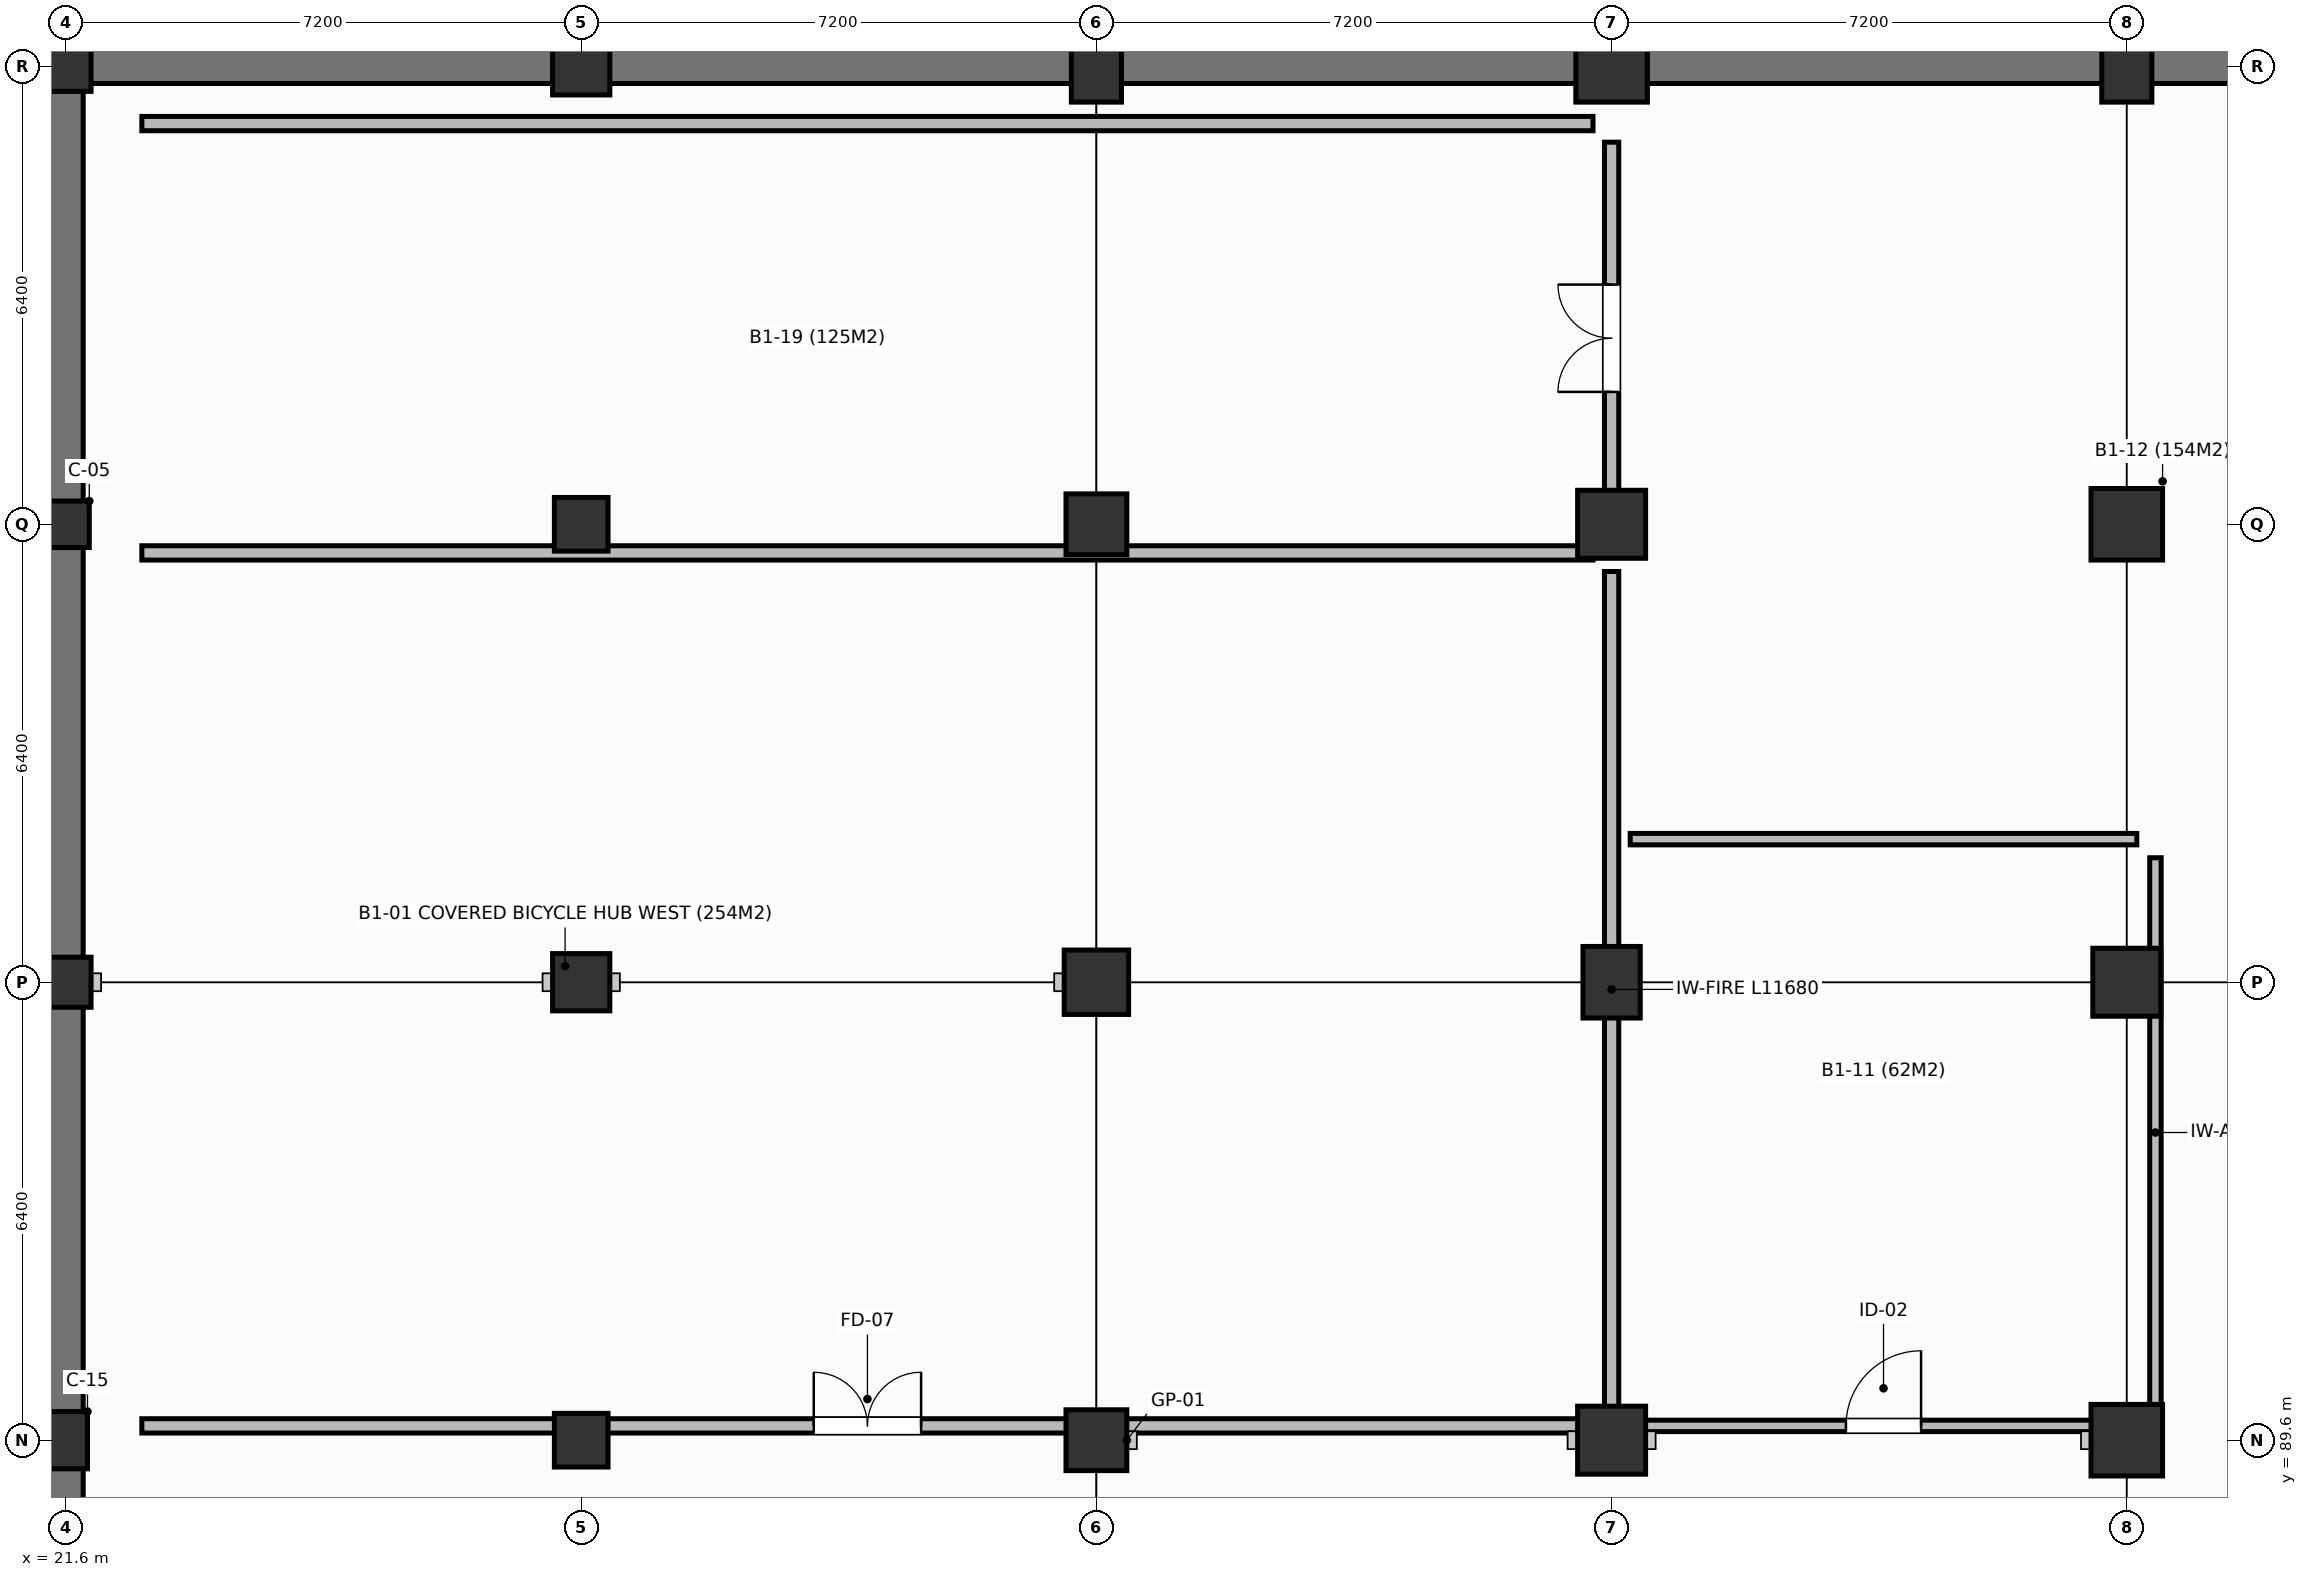
"""IFC4 building model, lengths in metres.
Left out: names, types, materials, properties, quantities, classifications, styles, units other than length and angle.
Written with IfcOpenShell. Run it as: python <this file> out.ifc"""

import sys

from ifc_helpers import new_model, si_unit, direction, frame, frame_2d, origin, origin_2d, place, context, subcontext, project, spatial, rectangle, extrude, element, fill, save


model = new_model("IFC4")
c1 = context("Model", 3, precision=1e-05, world=origin(), true_north=direction((0.0, 1.0)))
c2 = subcontext(c1, "Body", "Model", "MODEL_VIEW")
j1 = project(units=[si_unit("LENGTHUNIT", "METRE"), si_unit("PLANEANGLEUNIT", "RADIAN")], contexts=[c1])
p1 = place(None, origin())
s1 = spatial("IfcSite", under=j1, at=p1, CompositionType="ELEMENT")
p2 = place(p1, origin())
s2 = spatial("IfcBuilding", under=s1, at=p2, CompositionType="ELEMENT")
p3 = place(p2, frame((0.0, 0.0, -4.8)))
s3 = spatial("IfcBuildingStorey", under=s2, at=p3, CompositionType="ELEMENT", Elevation=-4.8)
p4 = place(p3, frame((21.6, 89.6, 0.0), z_axis=(0.0, 0.0, 1.0), x_axis=(1.0, 0.0, 0.0)))
e1 = element("IfcColumn", 1, at=p4, inside=s3, PredefinedType="COLUMN", context=c2, shape_type="SweptSolid", body=[
    extrude(rectangle(XDim=0.6, YDim=0.8, at=origin_2d()), origin(), (0.0, 0.0, 1.0), 4.8),
])
p5 = place(p3, frame((21.6, 96.0, 0.0), z_axis=(0.0, 0.0, 1.0), x_axis=(1.0, 0.0, 0.0)))
e2 = element("IfcColumn", 2, at=p5, inside=s3, PredefinedType="COLUMN", context=c2, shape_type="SweptSolid", body=[
    extrude(rectangle(XDim=0.7, YDim=0.7, at=origin_2d()), origin(), (0.0, 0.0, 1.0), 4.8),
])
p6 = place(p3, frame((21.6, 102.4, 0.0), z_axis=(0.0, 0.0, 1.0), x_axis=(1.0, 0.0, 0.0)))
e3 = element("IfcColumn", 3, at=p6, inside=s3, PredefinedType="COLUMN", context=c2, shape_type="SweptSolid", body=[
    extrude(rectangle(XDim=0.65, YDim=0.65, at=origin_2d()), origin(), (0.0, 0.0, 1.0), 4.8),
])
p7 = place(p3, frame((21.6, 108.8, 0.0), z_axis=(0.0, 0.0, 1.0), x_axis=(1.0, 0.0, 0.0)))
e4 = element("IfcColumn", 4, at=p7, inside=s3, PredefinedType="COLUMN", context=c2, shape_type="SweptSolid", body=[
    extrude(rectangle(XDim=0.7, YDim=0.7, at=origin_2d()), origin(), (0.0, 0.0, 1.0), 4.8),
])
p8 = place(p3, frame((28.8, 89.6, 0.0), z_axis=(0.0, 0.0, 1.0), x_axis=(1.0, 0.0, 0.0)))
e5 = element("IfcColumn", 5, at=p8, inside=s3, PredefinedType="COLUMN", context=c2, shape_type="SweptSolid", body=[
    extrude(rectangle(XDim=0.75, YDim=0.75, at=origin_2d()), origin(), (0.0, 0.0, 1.0), 4.8),
])
p9 = place(p3, frame((28.8, 96.0, 0.0), z_axis=(0.0, 0.0, 1.0), x_axis=(1.0, 0.0, 0.0)))
e6 = element("IfcColumn", 6, at=p9, inside=s3, PredefinedType="COLUMN", context=c2, shape_type="SweptSolid", body=[
    extrude(rectangle(XDim=0.8, YDim=0.8, at=origin_2d()), origin(), (0.0, 0.0, 1.0), 4.8),
])
p10 = place(p3, frame((28.8, 102.4, 0.0), z_axis=(0.0, 0.0, 1.0), x_axis=(1.0, 0.0, 0.0)))
e7 = element("IfcColumn", 7, at=p10, inside=s3, PredefinedType="COLUMN", context=c2, shape_type="SweptSolid", body=[
    extrude(rectangle(XDim=0.75, YDim=0.75, at=origin_2d()), origin(), (0.0, 0.0, 1.0), 4.8),
])
p11 = place(p3, frame((28.8, 108.8, 0.0), z_axis=(0.0, 0.0, 1.0), x_axis=(1.0, 0.0, 0.0)))
e8 = element("IfcColumn", 8, at=p11, inside=s3, PredefinedType="COLUMN", context=c2, shape_type="SweptSolid", body=[
    extrude(rectangle(XDim=0.8, YDim=0.8, at=origin_2d()), origin(), (0.0, 0.0, 1.0), 4.8),
])
p12 = place(p3, frame((36.0, 89.6, 0.0), z_axis=(0.0, 0.0, 1.0), x_axis=(1.0, 0.0, 0.0)))
e9 = element("IfcColumn", 9, at=p12, inside=s3, PredefinedType="COLUMN", context=c2, shape_type="SweptSolid", body=[
    extrude(rectangle(XDim=0.85, YDim=0.85, at=origin_2d()), origin(), (0.0, 0.0, 1.0), 4.8),
])
p13 = place(p3, frame((36.0, 96.0, 0.0), z_axis=(0.0, 0.0, 1.0), x_axis=(1.0, 0.0, 0.0)))
e10 = element("IfcColumn", 10, at=p13, inside=s3, PredefinedType="COLUMN", context=c2, shape_type="SweptSolid", body=[
    extrude(rectangle(XDim=0.9, YDim=0.9, at=origin_2d()), origin(), (0.0, 0.0, 1.0), 4.8),
])
p14 = place(p3, frame((36.0, 102.4, 0.0), z_axis=(0.0, 0.0, 1.0), x_axis=(1.0, 0.0, 0.0)))
e11 = element("IfcColumn", 11, at=p14, inside=s3, PredefinedType="COLUMN", context=c2, shape_type="SweptSolid", body=[
    extrude(rectangle(XDim=0.85, YDim=0.85, at=origin_2d()), origin(), (0.0, 0.0, 1.0), 4.8),
])
p15 = place(p3, frame((36.0, 108.8, 0.0), z_axis=(0.0, 0.0, 1.0), x_axis=(1.0, 0.0, 0.0)))
e12 = element("IfcColumn", 12, at=p15, inside=s3, PredefinedType="COLUMN", context=c2, shape_type="SweptSolid", body=[
    extrude(rectangle(XDim=0.7, YDim=1.0, at=origin_2d()), origin(), (0.0, 0.0, 1.0), 4.8),
])
p16 = place(p3, frame((43.2, 89.6, 0.0), z_axis=(0.0, 0.0, 1.0), x_axis=(1.0, 0.0, 0.0)))
e13 = element("IfcColumn", 13, at=p16, inside=s3, PredefinedType="COLUMN", context=c2, shape_type="SweptSolid", body=[
    extrude(rectangle(XDim=0.95, YDim=0.95, at=origin_2d()), origin(), (0.0, 0.0, 1.0), 4.8),
])
p17 = place(p3, frame((43.2, 96.0, 0.0), z_axis=(0.0, 0.0, 1.0), x_axis=(1.0, 0.0, 0.0)))
e14 = element("IfcColumn", 14, at=p17, inside=s3, PredefinedType="COLUMN", context=c2, shape_type="SweptSolid", body=[
    extrude(rectangle(XDim=0.8, YDim=1.0, at=origin_2d()), origin(), (0.0, 0.0, 1.0), 4.8),
])
p18 = place(p3, frame((43.2, 102.4, 0.0), z_axis=(0.0, 0.0, 1.0), x_axis=(1.0, 0.0, 0.0)))
e15 = element("IfcColumn", 15, at=p18, inside=s3, PredefinedType="COLUMN", context=c2, shape_type="SweptSolid", body=[
    extrude(rectangle(XDim=0.95, YDim=0.95, at=origin_2d()), origin(), (0.0, 0.0, 1.0), 4.8),
])
for number, where, z_axis, x_axis in (
    (16, (43.2, 108.8, 0.0), (0.0, 0.0, 1.0), (1.0, 0.0, 0.0)),
    (17, (50.4, 89.6, 0.0), (0.0, 0.0, 1.0), (1.0, 0.0, 0.0)),
):
    element("IfcColumn", number, at=place(p3, frame(where, z_axis=z_axis, x_axis=x_axis)), inside=s3, PredefinedType="COLUMN", context=c2, shape_type="SweptSolid", body=[
        extrude(rectangle(XDim=1.0, YDim=1.0, at=origin_2d()), origin(), (0.0, 0.0, 1.0), 4.8),
    ])
p19 = place(p3, frame((50.4, 96.0, 0.0), z_axis=(0.0, 0.0, 1.0), x_axis=(1.0, 0.0, 0.0)))
e18 = element("IfcColumn", 18, at=p19, inside=s3, PredefinedType="COLUMN", context=c2, shape_type="SweptSolid", body=[
    extrude(rectangle(XDim=0.95, YDim=0.95, at=origin_2d()), origin(), (0.0, 0.0, 1.0), 4.8),
])
p20 = place(p3, frame((50.4, 102.4, 0.0), z_axis=(0.0, 0.0, 1.0), x_axis=(1.0, 0.0, 0.0)))
e19 = element("IfcColumn", 19, at=p20, inside=s3, PredefinedType="COLUMN", context=c2, shape_type="SweptSolid", body=[
    extrude(rectangle(XDim=1.0, YDim=1.0, at=origin_2d()), origin(), (0.0, 0.0, 1.0), 4.8),
])
p21 = place(p3, frame((50.4, 108.8, 0.0), z_axis=(0.0, 0.0, 1.0), x_axis=(1.0, 0.0, 0.0)))
e20 = element("IfcColumn", 20, at=p21, inside=s3, PredefinedType="COLUMN", context=c2, shape_type="SweptSolid", body=[
    extrude(rectangle(XDim=0.7, YDim=1.0, at=origin_2d()), origin(), (0.0, 0.0, 1.0), 4.8),
])
p22 = place(p3, frame((21.6, 83.2, 0.0), z_axis=(0.0, 0.0, 1.0), x_axis=(0.0, 1.0, 0.0)))
e21 = element("IfcWall", 21, at=p22, inside=s3, PredefinedType="SOLIDWALL", context=c2, shape_type="SweptSolid", body=[
    extrude(rectangle(XDim=6.4, YDim=0.48, at=frame_2d((3.2, 0.0))), origin(), (0.0, 0.0, 1.0), 4.25),
])
for number, where, z_axis, x_axis in (
    (22, (21.6, 89.6, 0.0), (0.0, 0.0, 1.0), (0.0, 1.0, 0.0)),
    (23, (21.6, 96.0, 0.0), (0.0, 0.0, 1.0), (0.0, 1.0, 0.0)),
):
    element("IfcWall", number, at=place(p3, frame(where, z_axis=z_axis, x_axis=x_axis)), inside=s3, PredefinedType="SOLIDWALL", context=c2, shape_type="SweptSolid", body=[
        extrude(rectangle(XDim=6.4, YDim=0.48, at=frame_2d((3.2, 0.0))), origin(), (0.0, 0.0, 1.0), 4.25),
    ])
p23 = place(p3, frame((21.6, 102.4, 0.0), z_axis=(0.0, 0.0, 1.0), x_axis=(0.0, 1.0, 0.0)))
e24 = element("IfcWall", 24, at=p23, inside=s3, PredefinedType="SOLIDWALL", context=c2, shape_type="SweptSolid", body=[
    extrude(rectangle(XDim=6.4, YDim=0.48, at=frame_2d((3.2, 0.0))), origin(), (0.0, 0.0, 1.0), 4.25),
])
for number, where, z_axis, x_axis in (
    (25, (21.6, 108.8, 0.0), (0.0, 0.0, 1.0), (1.0, 0.0, 0.0)),
    (26, (28.8, 108.8, 0.0), (0.0, 0.0, 1.0), (1.0, 0.0, 0.0)),
    (27, (36.0, 108.8, 0.0), (0.0, 0.0, 1.0), (1.0, 0.0, 0.0)),
    (28, (43.2, 108.8, 0.0), (0.0, 0.0, 1.0), (1.0, 0.0, 0.0)),
):
    element("IfcWall", number, at=place(p3, frame(where, z_axis=z_axis, x_axis=x_axis)), inside=s3, PredefinedType="SOLIDWALL", context=c2, shape_type="SweptSolid", body=[
        extrude(rectangle(XDim=7.2, YDim=0.48, at=frame_2d((3.6, 0.0))), origin(), (0.0, 0.0, 1.0), 4.25),
    ])
p24 = place(p3, frame((50.4, 108.8, 0.0), z_axis=(0.0, 0.0, 1.0), x_axis=(1.0, 0.0, 0.0)))
e29 = element("IfcWall", 29, at=p24, inside=s3, PredefinedType="SOLIDWALL", context=c2, shape_type="SweptSolid", body=[
    extrude(rectangle(XDim=8.4, YDim=0.48, at=frame_2d((4.2, 0.0))), origin(), (0.0, 0.0, 1.0), 4.25),
])
p25 = place(p3, frame((22.66, 89.8, 0.0), z_axis=(0.0, 0.0, 1.0), x_axis=(1.0, 0.0, 0.0)))
e30 = element("IfcWall", 30, at=p25, inside=s3, PredefinedType="PARTITIONING", context=c2, shape_type="SweptSolid", body=[
    extrude(rectangle(XDim=20.28, YDim=0.2, at=frame_2d((10.14, 0.0))), origin(), (0.0, 0.0, 1.0), 2.625),
])
p26 = place(p25, frame((9.39, 0.0, 0.0)))
e31 = element("IfcOpeningElement", 31, at=p26, cuts=e30, PredefinedType="OPENING", context=c2, shape_type="SweptSolid", body=[
    extrude(rectangle(XDim=1.5, YDim=2.2, at=frame_2d((0.75, 1.1))), frame((0.0, 0.11, 0.0), z_axis=(0.0, -1.0, 0.0), x_axis=(1.0, 0.0, 0.0)), (0.0, 0.0, 1.0), 0.22),
])
p27 = place(p3, frame((43.2, 90.06, 0.0), z_axis=(0.0, 0.0, 1.0), x_axis=(0.0, 1.0, 0.0)))
e32 = element("IfcWall", 32, at=p27, inside=s3, PredefinedType="PARTITIONING", context=c2, shape_type="SweptSolid", body=[
    extrude(rectangle(XDim=11.68, YDim=0.2, at=frame_2d((5.84, 0.0))), origin(), (0.0, 0.0, 1.0), 3.125),
])
p28 = place(p3, frame((42.94, 102.0, 0.0), z_axis=(0.0, 0.0, 1.0), x_axis=(-1.0, 0.0, 0.0)))
e33 = element("IfcWall", 33, at=p28, inside=s3, PredefinedType="PARTITIONING", context=c2, shape_type="SweptSolid", body=[
    extrude(rectangle(XDim=20.28, YDim=0.2, at=frame_2d((10.14, 0.0))), origin(), (0.0, 0.0, 1.0), 3.325),
])
p29 = place(p3, frame((43.46, 89.8, 0.0), z_axis=(0.0, 0.0, 1.0), x_axis=(1.0, 0.0, 0.0)))
e34 = element("IfcWall", 34, at=p29, inside=s3, PredefinedType="PARTITIONING", context=c2, shape_type="SweptSolid", body=[
    extrude(rectangle(XDim=7.08, YDim=0.16, at=frame_2d((3.54, 0.0))), origin(), (0.0, 0.0, 1.0), 2.765),
])
p30 = place(p29, frame((3.015, 0.0, 0.0)))
e35 = element("IfcOpeningElement", 35, at=p30, cuts=e34, PredefinedType="OPENING", context=c2, shape_type="SweptSolid", body=[
    extrude(rectangle(XDim=1.05, YDim=2.1, at=frame_2d((0.525, 1.05))), frame((0.0, 0.09, 0.0), z_axis=(0.0, -1.0, 0.0), x_axis=(1.0, 0.0, 0.0)), (0.0, 0.0, 1.0), 0.18),
])
p31 = place(p3, frame((50.8, 90.06, 0.0), z_axis=(0.0, 0.0, 1.0), x_axis=(0.0, 1.0, 0.0)))
e36 = element("IfcWall", 36, at=p31, inside=s3, PredefinedType="PARTITIONING", context=c2, shape_type="SweptSolid", body=[
    extrude(rectangle(XDim=7.68, YDim=0.16, at=frame_2d((3.84, 0.0))), origin(), (0.0, 0.0, 1.0), 3.075),
])
p32 = place(p3, frame((50.54, 98.0, 0.0), z_axis=(0.0, 0.0, 1.0), x_axis=(-1.0, 0.0, 0.0)))
e37 = element("IfcWall", 37, at=p32, inside=s3, PredefinedType="PARTITIONING", context=c2, shape_type="SweptSolid", body=[
    extrude(rectangle(XDim=7.08, YDim=0.16, at=frame_2d((3.54, 0.0))), origin(), (0.0, 0.0, 1.0), 4.25),
])
p33 = place(p3, frame((43.2, 102.26, 0.0), z_axis=(0.0, 0.0, 1.0), x_axis=(0.0, 1.0, 0.0)))
e38 = element("IfcWall", 38, at=p33, inside=s3, PredefinedType="PARTITIONING", context=c2, shape_type="SweptSolid", body=[
    extrude(rectangle(XDim=5.48, YDim=0.2, at=frame_2d((2.74, 0.0))), origin(), (0.0, 0.0, 1.0), 3.075),
])
p34 = place(p33, frame((1.99, 0.0, 0.0)))
e39 = element("IfcOpeningElement", 39, at=p34, cuts=e38, PredefinedType="OPENING", context=c2, shape_type="SweptSolid", body=[
    extrude(rectangle(XDim=1.5, YDim=2.2, at=frame_2d((0.75, 1.1))), frame((0.0, 0.11, 0.0), z_axis=(0.0, -1.0, 0.0), x_axis=(1.0, 0.0, 0.0)), (0.0, 0.0, 1.0), 0.22),
])
p35 = place(p3, frame((42.94, 108.0, 0.0), z_axis=(0.0, 0.0, 1.0), x_axis=(-1.0, 0.0, 0.0)))
e40 = element("IfcWall", 40, at=p35, inside=s3, PredefinedType="PARTITIONING", context=c2, shape_type="SweptSolid", body=[
    extrude(rectangle(XDim=20.28, YDim=0.2, at=frame_2d((10.14, 0.0))), origin(), (0.0, 0.0, 1.0), 4.25),
])
p36 = place(p26, origin())
e41 = element("IfcDoor", 41, at=p36, inside=s3, OperationType="DOUBLE_DOOR_SINGLE_SWING", PredefinedType="DOOR", context=c2, shape_type="SweptSolid", body=[
    extrude(rectangle(XDim=1.5, YDim=2.2, at=frame_2d((0.75, 1.1))), frame((0.0, 0.025, 0.0), z_axis=(0.0, -1.0, 0.0), x_axis=(1.0, 0.0, 0.0)), (0.0, 0.0, 1.0), 0.05),
])
fill(e31, e41)
p37 = place(p30, origin())
e42 = element("IfcDoor", 42, at=p37, inside=s3, OperationType="SINGLE_SWING_RIGHT", PredefinedType="DOOR", context=c2, shape_type="SweptSolid", body=[
    extrude(rectangle(XDim=1.05, YDim=2.1, at=frame_2d((0.525, 1.05))), frame((0.0, 0.025, 0.0), z_axis=(0.0, -1.0, 0.0), x_axis=(1.0, 0.0, 0.0)), (0.0, 0.0, 1.0), 0.05),
])
fill(e35, e42)
p38 = place(p34, origin())
e43 = element("IfcDoor", 43, at=p38, inside=s3, OperationType="DOUBLE_DOOR_SINGLE_SWING", PredefinedType="DOOR", context=c2, shape_type="SweptSolid", body=[
    extrude(rectangle(XDim=1.5, YDim=2.2, at=frame_2d((0.75, 1.1))), frame((0.0, 0.025, 0.0), z_axis=(0.0, -1.0, 0.0), x_axis=(1.0, 0.0, 0.0)), (0.0, 0.0, 1.0), 0.05),
])
fill(e39, e43)
save(model, sys.argv[1])
